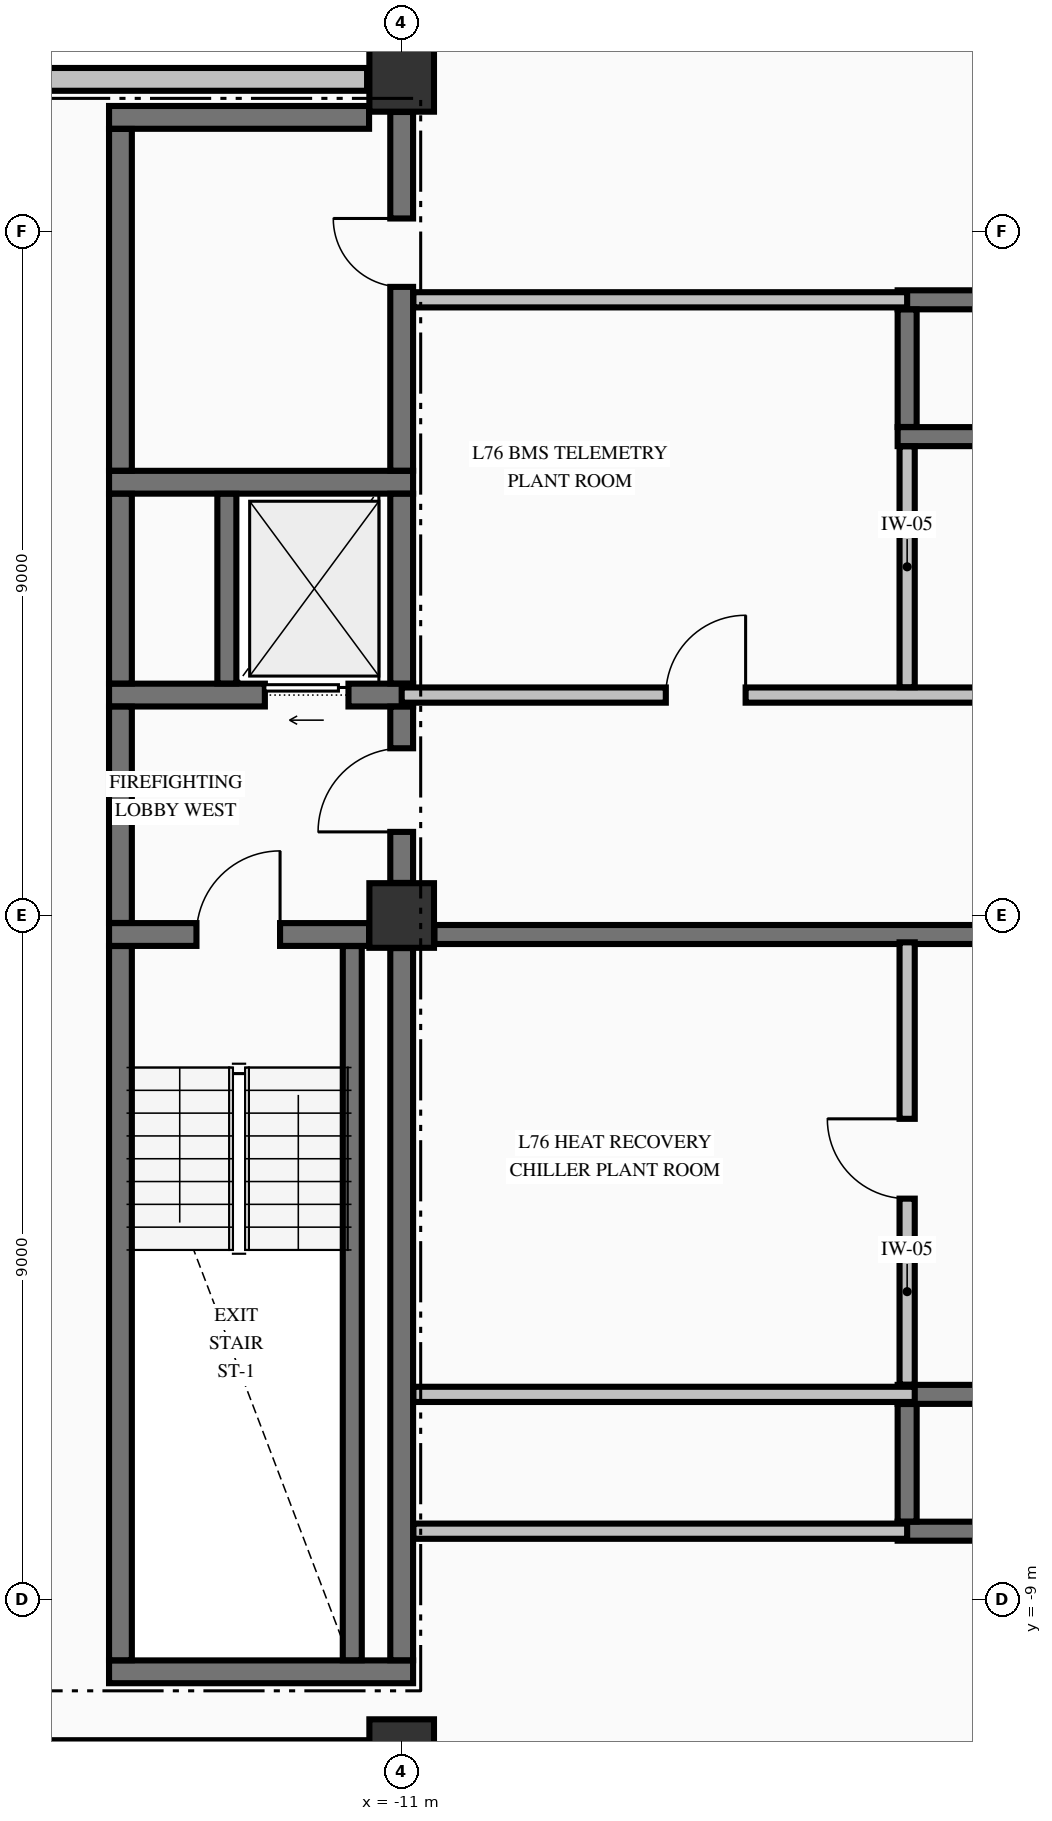
"""IFC4 building model, lengths in metres.
Left out: names, types, materials, properties, quantities, classifications, styles, units other than length and angle.
Written with IfcOpenShell. Run it as: python <this file> out.ifc"""

import sys

from ifc_helpers import new_model, si_unit, direction, frame, frame_2d, origin, origin_2d, place, context, subcontext, project, spatial, rectangle, extrude, element, fill, save


model = new_model("IFC4")
c1 = context("Model", 3, precision=1e-05, world=origin(), true_north=direction((0.0, 1.0)))
c2 = subcontext(c1, "Body", "Model", "MODEL_VIEW")
j1 = project(units=[si_unit("LENGTHUNIT", "METRE"), si_unit("PLANEANGLEUNIT", "RADIAN")], contexts=[c1])
p1 = place(None, origin())
s1 = spatial("IfcSite", under=j1, at=p1, CompositionType="ELEMENT")
p2 = place(p1, origin())
s2 = spatial("IfcBuilding", under=s1, at=p2, CompositionType="ELEMENT")
p3 = place(p2, frame((0.0, 0.0, 284.86)))
s3 = spatial("IfcBuildingStorey", under=s2, at=p3, CompositionType="ELEMENT", Elevation=284.86)
for number, where, z_axis, x_axis in (
    (1, (-11.0, -11.0, -0.325), (0.0, 0.0, 1.0), (1.0, 0.0, 0.0)),
    (2, (-11.0, 11.0, -0.325), (0.0, 0.0, 1.0), (1.0, 0.0, 0.0)),
    (3, (-11.0, 0.0, -0.325), (0.0, 0.0, 1.0), (1.0, 0.0, 0.0)),
):
    element("IfcColumn", number, at=place(p3, frame(where, z_axis=z_axis, x_axis=x_axis)), inside=s3, PredefinedType="COLUMN", context=c2, shape_type="SweptSolid", body=[
        extrude(rectangle(XDim=0.85, YDim=0.85, at=origin_2d()), origin(), (0.0, 0.0, 1.0), 3.06),
    ])
for number, where, z_axis, x_axis in (
    (4, (-11.455, 11.0, 0.0), (0.0, 0.0, 1.0), (-1.0, 0.0, 0.0)),
    (5, (-18.045, -11.0, 0.0), (0.0, 0.0, 1.0), (1.0, 0.0, 0.0)),
):
    element("IfcWall", number, at=place(p3, frame(where, z_axis=z_axis, x_axis=x_axis)), inside=s3, PredefinedType="STANDARD", context=c2, shape_type="SweptSolid", body=[
        extrude(rectangle(XDim=6.59, YDim=0.3, at=frame_2d((3.295, 0.0))), origin(), (0.0, 0.0, 1.0), 1.077),
    ])
p4 = place(p3, frame((-14.85, -9.95, 0.0), z_axis=(0.0, 0.0, 1.0), x_axis=(1.0, 0.0, 0.0)))
e6 = element("IfcWall", 6, at=p4, inside=s3, PredefinedType="SHEAR", context=c2, shape_type="SweptSolid", body=[
    extrude(rectangle(XDim=4.0, YDim=0.3, at=frame_2d((2.0, 0.0))), origin(), (0.0, 0.0, 1.0), 2.735),
])
p5 = place(p3, frame((-4.475, -8.1, 0.0), z_axis=(0.0, 0.0, 1.0), x_axis=(1.0, 0.0, 0.0)))
e7 = element("IfcWall", 7, at=p5, inside=s3, PredefinedType="SOLIDWALL", context=c2, shape_type="SweptSolid", body=[
    extrude(rectangle(XDim=8.75, YDim=0.25, at=frame_2d((4.375, 0.0))), origin(), (0.0, 0.0, 1.0), 2.735),
])
p6 = place(p3, frame((-4.475, -6.3, 0.0), z_axis=(0.0, 0.0, 1.0), x_axis=(1.0, 0.0, 0.0)))
e8 = element("IfcWall", 8, at=p6, inside=s3, PredefinedType="SOLIDWALL", context=c2, shape_type="SweptSolid", body=[
    extrude(rectangle(XDim=8.75, YDim=0.25, at=frame_2d((4.375, 0.0))), origin(), (0.0, 0.0, 1.0), 2.735),
])
p7 = place(p6, frame((7.05, 0.0, 0.0)))
e9 = element("IfcOpeningElement", 9, at=p7, cuts=e8, PredefinedType="OPENING", context=c2, shape_type="SweptSolid", body=[
    extrude(rectangle(XDim=1.05, YDim=2.15, at=frame_2d((0.525, 1.075))), frame((0.0, 0.135, 0.0), z_axis=(0.0, -1.0, 0.0), x_axis=(1.0, 0.0, 0.0)), (0.0, 0.0, 1.0), 0.27),
])
p8 = place(p3, frame((-14.85, -0.25, 0.0), z_axis=(0.0, 0.0, 1.0), x_axis=(1.0, 0.0, 0.0)))
e10 = element("IfcWall", 10, at=p8, inside=s3, PredefinedType="SHEAR", context=c2, shape_type="SweptSolid", body=[
    extrude(rectangle(XDim=3.421, YDim=0.3, at=frame_2d((1.71, 0.0))), origin(), (0.0, 0.0, 1.0), 2.735),
])
p9 = place(p8, frame((1.15, 0.0, 0.0)))
e11 = element("IfcOpeningElement", 11, at=p9, cuts=e10, PredefinedType="OPENING", context=c2, shape_type="SweptSolid", body=[
    extrude(rectangle(XDim=1.1, YDim=2.15, at=frame_2d((0.55, 1.075))), frame((0.0, 0.16, 0.0), z_axis=(0.0, -1.0, 0.0), x_axis=(1.0, 0.0, 0.0)), (0.0, 0.0, 1.0), 0.32),
])
p10 = place(p3, frame((-14.85, 2.9, 0.0), z_axis=(0.0, 0.0, 1.0), x_axis=(1.0, 0.0, 0.0)))
e12 = element("IfcWall", 12, at=p10, inside=s3, PredefinedType="SHEAR", context=c2, shape_type="SweptSolid", body=[
    extrude(rectangle(XDim=4.0, YDim=0.3, at=frame_2d((2.0, 0.0))), origin(), (0.0, 0.0, 1.0), 2.735),
])
p11 = place(p10, frame((2.05, 0.0, 0.0)))
e13 = element("IfcOpeningElement", 13, at=p11, cuts=e12, PredefinedType="OPENING", context=c2, shape_type="SweptSolid", body=[
    extrude(rectangle(XDim=1.1, YDim=2.2, at=frame_2d((0.55, 1.1))), frame((0.0, 0.16, 0.0), z_axis=(0.0, -1.0, 0.0), x_axis=(1.0, 0.0, 0.0)), (0.0, 0.0, 1.0), 0.32),
])
p12 = place(p3, frame((-14.85, 5.7, 0.0), z_axis=(0.0, 0.0, 1.0), x_axis=(1.0, 0.0, 0.0)))
e14 = element("IfcWall", 14, at=p12, inside=s3, PredefinedType="SHEAR", context=c2, shape_type="SweptSolid", body=[
    extrude(rectangle(XDim=4.0, YDim=0.3, at=frame_2d((2.0, 0.0))), origin(), (0.0, 0.0, 1.0), 2.735),
])
p13 = place(p3, frame((-4.475, 6.3, 0.0), z_axis=(0.0, 0.0, 1.0), x_axis=(1.0, 0.0, 0.0)))
e15 = element("IfcWall", 15, at=p13, inside=s3, PredefinedType="SOLIDWALL", context=c2, shape_type="SweptSolid", body=[
    extrude(rectangle(XDim=8.75, YDim=0.25, at=frame_2d((4.375, 0.0))), origin(), (0.0, 0.0, 1.0), 2.735),
])
p14 = place(p13, frame((7.05, 0.0, 0.0)))
e16 = element("IfcOpeningElement", 16, at=p14, cuts=e15, PredefinedType="OPENING", context=c2, shape_type="SweptSolid", body=[
    extrude(rectangle(XDim=1.05, YDim=2.15, at=frame_2d((0.525, 1.075))), frame((0.0, 0.135, 0.0), z_axis=(0.0, -1.0, 0.0), x_axis=(1.0, 0.0, 0.0)), (0.0, 0.0, 1.0), 0.27),
])
p15 = place(p3, frame((-4.475, 8.1, 0.0), z_axis=(0.0, 0.0, 1.0), x_axis=(1.0, 0.0, 0.0)))
e17 = element("IfcWall", 17, at=p15, inside=s3, PredefinedType="SOLIDWALL", context=c2, shape_type="SweptSolid", body=[
    extrude(rectangle(XDim=8.75, YDim=0.25, at=frame_2d((4.375, 0.0))), origin(), (0.0, 0.0, 1.0), 2.735),
])
p16 = place(p3, frame((-14.85, 10.5, 0.0), z_axis=(0.0, 0.0, 1.0), x_axis=(1.0, 0.0, 0.0)))
e18 = element("IfcWall", 18, at=p16, inside=s3, PredefinedType="SHEAR", context=c2, shape_type="SweptSolid", body=[
    extrude(rectangle(XDim=3.421, YDim=0.3, at=frame_2d((1.71, 0.0))), origin(), (0.0, 0.0, 1.0), 2.735),
])
p17 = place(p3, frame((-10.847, -8.1, 0.0), z_axis=(0.0, 0.0, 1.0), x_axis=(1.0, 0.0, 0.0)))
e19 = element("IfcWall", 19, at=p17, inside=s3, PredefinedType="PARTITIONING", context=c2, shape_type="SweptSolid", body=[
    extrude(rectangle(XDim=6.497, YDim=0.2, at=frame_2d((3.249, 0.0))), origin(), (0.0, 0.0, 1.0), 2.735),
])
p18 = place(p3, frame((-10.847, -6.3, 0.0), z_axis=(0.0, 0.0, 1.0), x_axis=(1.0, 0.0, 0.0)))
e20 = element("IfcWall", 20, at=p18, inside=s3, PredefinedType="PARTITIONING", context=c2, shape_type="SweptSolid", body=[
    extrude(rectangle(XDim=6.597, YDim=0.2, at=frame_2d((3.298, 0.0))), origin(), (0.0, 0.0, 1.0), 2.735),
])
p19 = place(p3, frame((-10.569, -0.25, 0.0), z_axis=(0.0, 0.0, 1.0), x_axis=(1.0, 0.0, 0.0)))
e21 = element("IfcWall", 21, at=p19, inside=s3, PredefinedType="SOLIDWALL", context=c2, shape_type="SweptSolid", body=[
    extrude(rectangle(XDim=21.138, YDim=0.25, at=frame_2d((10.569, 0.0))), origin(), (0.0, 0.0, 1.0), 2.735),
])
p20 = place(p19, frame((7.519, 0.0, 0.0)))
e22 = element("IfcOpeningElement", 22, at=p20, cuts=e21, PredefinedType="OPENING", context=c2, shape_type="SweptSolid", body=[
    extrude(rectangle(XDim=0.95, YDim=2.02, at=frame_2d((0.475, 1.01))), frame((0.0, 0.135, 0.0), z_axis=(0.0, -1.0, 0.0), x_axis=(1.0, 0.0, 0.0)), (0.0, 0.0, 1.0), 0.27),
])
p21 = place(p3, frame((-11.0, 2.9, 0.0), z_axis=(0.0, 0.0, 1.0), x_axis=(1.0, 0.0, 0.0)))
e23 = element("IfcWall", 23, at=p21, inside=s3, PredefinedType="PARTITIONING", context=c2, shape_type="SweptSolid", body=[
    extrude(rectangle(XDim=22.0, YDim=0.2, at=frame_2d((11.0, 0.0))), origin(), (0.0, 0.0, 1.0), 2.735),
])
p22 = place(p21, frame((7.95, 0.0, 0.0)))
e24 = element("IfcOpeningElement", 24, at=p22, cuts=e23, PredefinedType="OPENING", context=c2, shape_type="SweptSolid", body=[
    extrude(rectangle(XDim=1.1, YDim=2.15, at=frame_2d((0.55, 1.075))), frame((0.0, 0.11, 0.0), z_axis=(0.0, -1.0, 0.0), x_axis=(1.0, 0.0, 0.0)), (0.0, 0.0, 1.0), 0.22),
])
p23 = place(p21, frame((17.475, 0.0, 0.0)))
e25 = element("IfcOpeningElement", 25, at=p23, cuts=e23, PredefinedType="OPENING", context=c2, shape_type="SweptSolid", body=[
    extrude(rectangle(XDim=1.05, YDim=2.15, at=frame_2d((0.525, 1.075))), frame((0.0, 0.11, 0.0), z_axis=(0.0, -1.0, 0.0), x_axis=(1.0, 0.0, 0.0)), (0.0, 0.0, 1.0), 0.22),
])
p24 = place(p21, frame((3.475, 0.0, 0.0)))
e26 = element("IfcOpeningElement", 26, at=p24, cuts=e23, PredefinedType="OPENING", context=c2, shape_type="SweptSolid", body=[
    extrude(rectangle(XDim=1.05, YDim=2.15, at=frame_2d((0.525, 1.075))), frame((0.0, 0.11, 0.0), z_axis=(0.0, -1.0, 0.0), x_axis=(1.0, 0.0, 0.0)), (0.0, 0.0, 1.0), 0.22),
])
p25 = place(p3, frame((-10.847, 8.1, 0.0), z_axis=(0.0, 0.0, 1.0), x_axis=(1.0, 0.0, 0.0)))
e27 = element("IfcWall", 27, at=p25, inside=s3, PredefinedType="PARTITIONING", context=c2, shape_type="SweptSolid", body=[
    extrude(rectangle(XDim=6.497, YDim=0.2, at=frame_2d((3.249, 0.0))), origin(), (0.0, 0.0, 1.0), 2.735),
])
p26 = place(p3, frame((-14.7, -9.798, 0.0), z_axis=(0.0, 0.0, 1.0), x_axis=(0.0, 1.0, 0.0)))
e28 = element("IfcWall", 28, at=p26, inside=s3, PredefinedType="SHEAR", context=c2, shape_type="SweptSolid", body=[
    extrude(rectangle(XDim=9.396, YDim=0.3, at=frame_2d((4.698, 0.0))), origin(), (0.0, 0.0, 1.0), 2.735),
])
p27 = place(p3, frame((-14.7, -0.098, 0.0), z_axis=(0.0, 0.0, 1.0), x_axis=(0.0, 1.0, 0.0)))
e29 = element("IfcWall", 29, at=p27, inside=s3, PredefinedType="SHEAR", context=c2, shape_type="SweptSolid", body=[
    extrude(rectangle(XDim=2.846, YDim=0.3, at=frame_2d((1.423, 0.0))), origin(), (0.0, 0.0, 1.0), 2.735),
])
p28 = place(p3, frame((-14.7, 3.052, 0.0), z_axis=(0.0, 0.0, 1.0), x_axis=(0.0, 1.0, 0.0)))
e30 = element("IfcWall", 30, at=p28, inside=s3, PredefinedType="SHEAR", context=c2, shape_type="SweptSolid", body=[
    extrude(rectangle(XDim=2.496, YDim=0.3, at=frame_2d((1.248, 0.0))), origin(), (0.0, 0.0, 1.0), 2.735),
])
p29 = place(p3, frame((-14.7, 5.852, 0.0), z_axis=(0.0, 0.0, 1.0), x_axis=(0.0, 1.0, 0.0)))
e31 = element("IfcWall", 31, at=p29, inside=s3, PredefinedType="SHEAR", context=c2, shape_type="SweptSolid", body=[
    extrude(rectangle(XDim=4.496, YDim=0.3, at=frame_2d((2.248, 0.0))), origin(), (0.0, 0.0, 1.0), 2.735),
])
p30 = place(p3, frame((-13.3, 3.052, 0.0), z_axis=(0.0, 0.0, 1.0), x_axis=(0.0, 1.0, 0.0)))
e32 = element("IfcWall", 32, at=p30, inside=s3, PredefinedType="SOLIDWALL", context=c2, shape_type="SweptSolid", body=[
    extrude(rectangle(XDim=2.496, YDim=0.25, at=frame_2d((1.248, 0.0))), origin(), (0.0, 0.0, 1.0), 2.735),
])
p31 = place(p3, frame((-11.65, -9.798, 0.0), z_axis=(0.0, 0.0, 1.0), x_axis=(0.0, 1.0, 0.0)))
e33 = element("IfcWall", 33, at=p31, inside=s3, PredefinedType="SOLIDWALL", context=c2, shape_type="SweptSolid", body=[
    extrude(rectangle(XDim=9.396, YDim=0.25, at=frame_2d((4.698, 0.0))), origin(), (0.0, 0.0, 1.0), 2.735),
])
p32 = place(p3, frame((-11.0, -9.798, 0.0), z_axis=(0.0, 0.0, 1.0), x_axis=(0.0, 1.0, 0.0)))
e34 = element("IfcWall", 34, at=p32, inside=s3, PredefinedType="SHEAR", context=c2, shape_type="SweptSolid", body=[
    extrude(rectangle(XDim=9.369, YDim=0.3, at=frame_2d((4.685, 0.0))), origin(), (0.0, 0.0, 1.0), 2.735),
])
p33 = place(p3, frame((-11.0, 0.429, 0.0), z_axis=(0.0, 0.0, 1.0), x_axis=(0.0, 1.0, 0.0)))
e35 = element("IfcWall", 35, at=p33, inside=s3, PredefinedType="SHEAR", context=c2, shape_type="SweptSolid", body=[
    extrude(rectangle(XDim=2.319, YDim=0.3, at=frame_2d((1.16, 0.0))), origin(), (0.0, 0.0, 1.0), 2.735),
])
p34 = place(p33, frame((0.671, 0.0, 0.0)))
e36 = element("IfcOpeningElement", 36, at=p34, cuts=e35, PredefinedType="OPENING", context=c2, shape_type="SweptSolid", body=[
    extrude(rectangle(XDim=1.1, YDim=2.15, at=frame_2d((0.55, 1.075))), frame((0.0, 0.16, 0.0), z_axis=(0.0, -1.0, 0.0), x_axis=(1.0, 0.0, 0.0)), (0.0, 0.0, 1.0), 0.32),
])
p35 = place(p3, frame((-11.0, 3.052, 0.0), z_axis=(0.0, 0.0, 1.0), x_axis=(0.0, 1.0, 0.0)))
e37 = element("IfcWall", 37, at=p35, inside=s3, PredefinedType="SHEAR", context=c2, shape_type="SweptSolid", body=[
    extrude(rectangle(XDim=2.496, YDim=0.3, at=frame_2d((1.248, 0.0))), origin(), (0.0, 0.0, 1.0), 2.735),
])
p36 = place(p3, frame((-11.0, 5.852, 0.0), z_axis=(0.0, 0.0, 1.0), x_axis=(0.0, 1.0, 0.0)))
e38 = element("IfcWall", 38, at=p36, inside=s3, PredefinedType="SHEAR", context=c2, shape_type="SweptSolid", body=[
    extrude(rectangle(XDim=4.719, YDim=0.3, at=frame_2d((2.359, 0.0))), origin(), (0.0, 0.0, 1.0), 2.735),
])
p37 = place(p36, frame((2.418, 0.0, 0.0)))
e39 = element("IfcOpeningElement", 39, at=p37, cuts=e38, PredefinedType="OPENING", context=c2, shape_type="SweptSolid", body=[
    extrude(rectangle(XDim=0.9, YDim=2.15, at=frame_2d((0.45, 1.075))), frame((0.0, 0.16, 0.0), z_axis=(0.0, -1.0, 0.0), x_axis=(1.0, 0.0, 0.0)), (0.0, 0.0, 1.0), 0.32),
])
for number, where, z_axis, x_axis in (
    (40, (-4.35, -7.973, 0.0), (0.0, 0.0, 1.0), (0.0, 1.0, 0.0)),
    (41, (-4.35, 6.427, 0.0), (0.0, 0.0, 1.0), (0.0, 1.0, 0.0)),
):
    element("IfcWall", number, at=place(p3, frame(where, z_axis=z_axis, x_axis=x_axis)), inside=s3, PredefinedType="SOLIDWALL", context=c2, shape_type="SweptSolid", body=[
        extrude(rectangle(XDim=1.546, YDim=0.25, at=frame_2d((0.773, 0.0))), origin(), (0.0, 0.0, 1.0), 2.735),
    ])
p38 = place(p3, frame((-4.35, -6.172, 0.0), z_axis=(0.0, 0.0, 1.0), x_axis=(0.0, 1.0, 0.0)))
e42 = element("IfcWall", 42, at=p38, inside=s3, PredefinedType="PARTITIONING", context=c2, shape_type="SweptSolid", body=[
    extrude(rectangle(XDim=5.819, YDim=0.2, at=frame_2d((2.91, 0.0))), origin(), (0.0, 0.0, 1.0), 2.735),
])
p39 = place(p38, frame((2.447, 0.0, 0.0)))
e43 = element("IfcOpeningElement", 43, at=p39, cuts=e42, PredefinedType="OPENING", context=c2, shape_type="SweptSolid", body=[
    extrude(rectangle(XDim=1.05, YDim=2.15, at=frame_2d((0.525, 1.075))), frame((0.0, 0.11, 0.0), z_axis=(0.0, -1.0, 0.0), x_axis=(1.0, 0.0, 0.0)), (0.0, 0.0, 1.0), 0.22),
])
p40 = place(p3, frame((-4.35, 3.003, 0.0), z_axis=(0.0, 0.0, 1.0), x_axis=(0.0, 1.0, 0.0)))
e44 = element("IfcWall", 44, at=p40, inside=s3, PredefinedType="PARTITIONING", context=c2, shape_type="SweptSolid", body=[
    extrude(rectangle(XDim=3.169, YDim=0.2, at=frame_2d((1.584, 0.0))), origin(), (0.0, 0.0, 1.0), 2.735),
])
p41 = place(p9, origin())
e45 = element("IfcDoor", 45, at=p41, inside=s3, OperationType="SINGLE_SWING_RIGHT", PredefinedType="DOOR", context=c2, shape_type="SweptSolid", body=[
    extrude(rectangle(XDim=1.1, YDim=2.15, at=frame_2d((0.55, 1.075))), frame((0.0, 0.025, 0.0), z_axis=(0.0, -1.0, 0.0), x_axis=(1.0, 0.0, 0.0)), (0.0, 0.0, 1.0), 0.05),
])
fill(e11, e45)
p42 = place(p34, origin())
e46 = element("IfcDoor", 46, at=p42, inside=s3, OperationType="SINGLE_SWING_LEFT", PredefinedType="DOOR", context=c2, shape_type="SweptSolid", body=[
    extrude(rectangle(XDim=1.1, YDim=2.15, at=frame_2d((0.55, 1.075))), frame((0.0, 0.025, 0.0), z_axis=(0.0, -1.0, 0.0), x_axis=(1.0, 0.0, 0.0)), (0.0, 0.0, 1.0), 0.05),
])
fill(e36, e46)
p43 = place(p11, origin())
e47 = element("IfcDoor", 47, at=p43, inside=s3, OperationType="SLIDING_TO_LEFT", PredefinedType="DOOR", context=c2, shape_type="SweptSolid", body=[
    extrude(rectangle(XDim=1.1, YDim=2.2, at=frame_2d((0.55, 1.1))), frame((0.0, 0.025, 0.0), z_axis=(0.0, -1.0, 0.0), x_axis=(1.0, 0.0, 0.0)), (0.0, 0.0, 1.0), 0.05),
])
fill(e13, e47)
p44 = place(p37, origin())
e48 = element("IfcDoor", 48, at=p44, inside=s3, OperationType="SINGLE_SWING_RIGHT", PredefinedType="DOOR", context=c2, shape_type="SweptSolid", body=[
    extrude(rectangle(XDim=0.9, YDim=2.15, at=frame_2d((0.45, 1.075))), frame((0.0, 0.025, 0.0), z_axis=(0.0, -1.0, 0.0), x_axis=(1.0, 0.0, 0.0)), (0.0, 0.0, 1.0), 0.05),
])
fill(e39, e48)
p45 = place(p39, origin())
e49 = element("IfcDoor", 49, at=p45, inside=s3, OperationType="SINGLE_SWING_RIGHT", PredefinedType="DOOR", context=c2, shape_type="SweptSolid", body=[
    extrude(rectangle(XDim=1.05, YDim=2.15, at=frame_2d((0.525, 1.075))), frame((0.0, 0.025, 0.0), z_axis=(0.0, -1.0, 0.0), x_axis=(1.0, 0.0, 0.0)), (0.0, 0.0, 1.0), 0.05),
])
fill(e43, e49)
p46 = place(p24, origin())
e50 = element("IfcDoor", 50, at=p46, inside=s3, OperationType="SINGLE_SWING_RIGHT", PredefinedType="DOOR", context=c2, shape_type="SweptSolid", body=[
    extrude(rectangle(XDim=1.05, YDim=2.15, at=frame_2d((0.525, 1.075))), frame((0.0, 0.025, 0.0), z_axis=(0.0, -1.0, 0.0), x_axis=(1.0, 0.0, 0.0)), (0.0, 0.0, 1.0), 0.05),
])
fill(e26, e50)
save(model, sys.argv[1])
